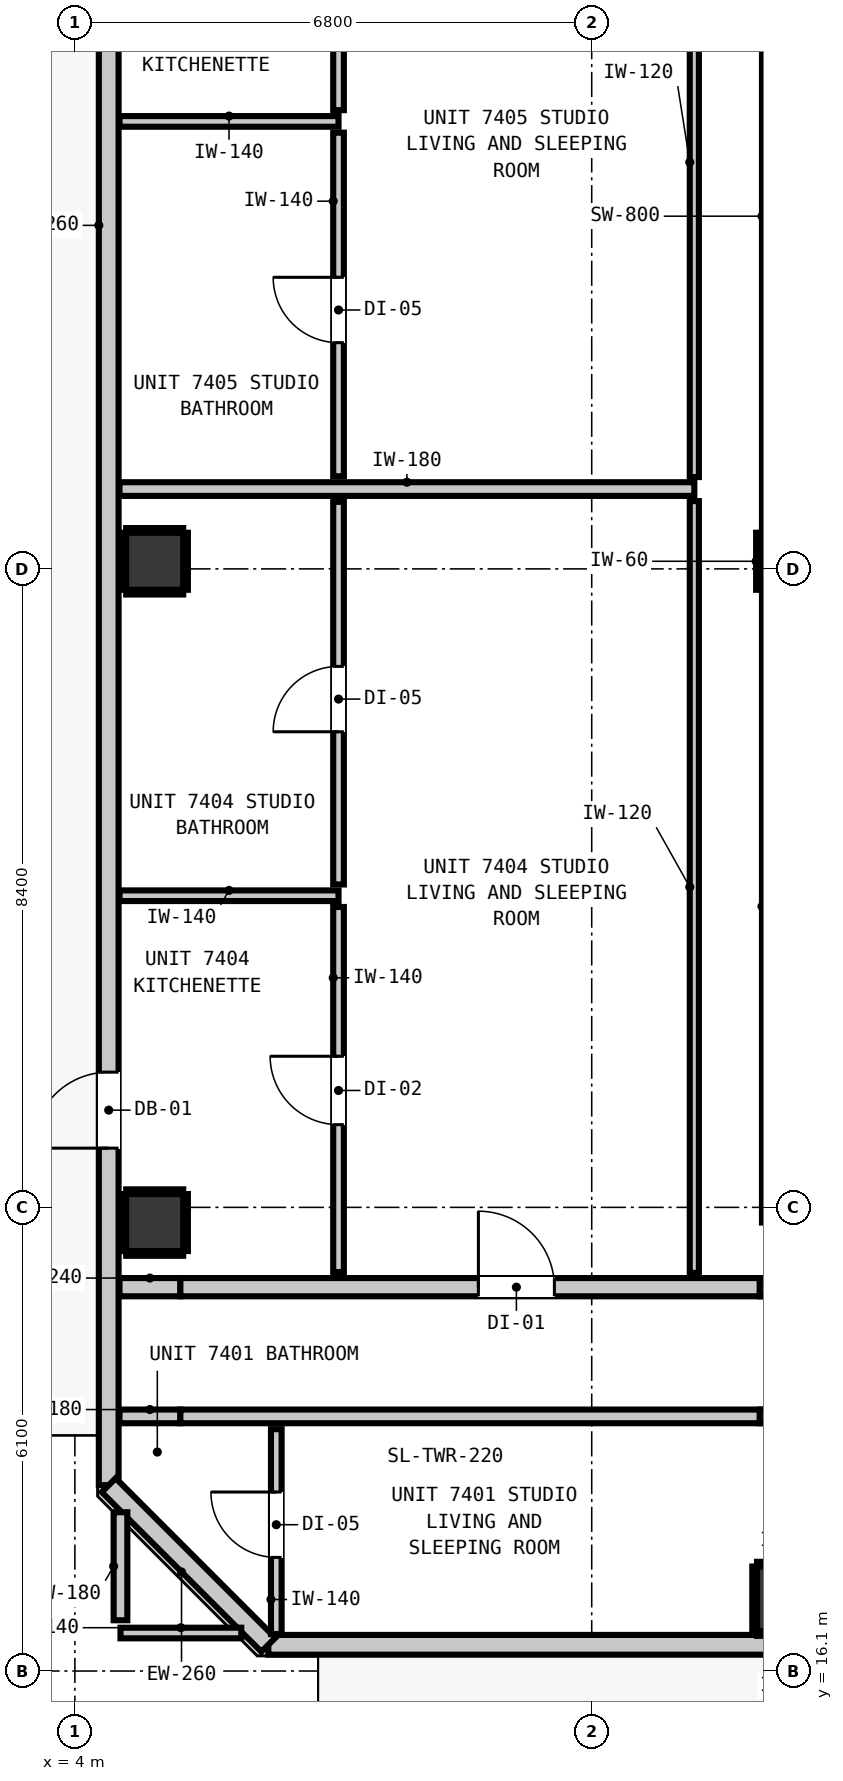
"""IFC4 building model, lengths in metres.
Left out: names, types, materials, properties, quantities, classifications, styles, units other than length and angle.
Written with IfcOpenShell. Run it as: python <this file> out.ifc"""

import sys

from ifc_helpers import new_model, si_unit, direction, frame, frame_2d, origin, origin_2d, place, context, subcontext, project, spatial, rectangle, extrude, element, fill, save


model = new_model("IFC4")
c1 = context("Model", 3, precision=1e-05, world=origin(), true_north=direction((0.0, 1.0)))
c2 = subcontext(c1, "Body", "Model", "MODEL_VIEW")
j1 = project(units=[si_unit("LENGTHUNIT", "METRE"), si_unit("PLANEANGLEUNIT", "RADIAN")], contexts=[c1])
p1 = place(None, origin())
s1 = spatial("IfcSite", under=j1, at=p1, CompositionType="ELEMENT")
p2 = place(p1, origin())
s2 = spatial("IfcBuilding", under=s1, at=p2, CompositionType="ELEMENT")
p3 = place(p2, frame((0.0, 0.0, 254.52)))
s3 = spatial("IfcBuildingStorey", under=s2, at=p3, CompositionType="ELEMENT", Elevation=254.52)
p4 = place(p3, frame((13.4, 30.7, 0.0), z_axis=(0.0, 0.0, 1.0), x_axis=(1.0, 0.0, 0.0)))
e1 = element("IfcColumn", 1, at=p4, inside=s3, PredefinedType="COLUMN", context=c2, shape_type="SweptSolid", body=[
    extrude(rectangle(XDim=0.75, YDim=0.75, at=origin_2d()), origin(), (0.0, 0.0, 1.0), 3.32),
])
p5 = place(p3, frame((13.44, 22.0, 0.0), z_axis=(0.0, 0.0, 1.0), x_axis=(0.0, 1.0, 0.0)))
e2 = element("IfcWall", 2, at=p5, inside=s3, PredefinedType="SHEAR", context=c2, shape_type="SweptSolid", body=[
    extrude(rectangle(XDim=8.32, YDim=0.8, at=frame_2d((4.16, 0.0))), origin(), (0.0, 0.0, 1.0), 3.32),
])
p6 = place(p3, frame((13.44, 31.08, 0.0), z_axis=(0.0, 0.0, 1.0), x_axis=(0.0, 1.0, 0.0)))
e3 = element("IfcWall", 3, at=p6, inside=s3, PredefinedType="SHEAR", context=c2, shape_type="SweptSolid", body=[
    extrude(rectangle(XDim=8.32, YDim=0.8, at=frame_2d((4.16, 0.0))), origin(), (0.0, 0.0, 1.0), 3.32),
])
p7 = place(p3, frame((13.4, 17.05, 0.0), z_axis=(0.0, 0.0, 1.0), x_axis=(1.0, 0.0, 0.0)))
e4 = element("IfcColumn", 4, at=p7, inside=s3, PredefinedType="COLUMN", context=c2, shape_type="SweptSolid", body=[
    extrude(rectangle(XDim=0.85, YDim=0.85, at=origin_2d()), origin(), (0.0, 0.0, 1.0), 3.32),
])
for number, where, z_axis, x_axis in (
    (5, (5.05, 22.0, 0.0), (0.0, 0.0, 1.0), (1.0, 0.0, 0.0)),
    (6, (5.05, 30.7, 0.0), (0.0, 0.0, 1.0), (1.0, 0.0, 0.0)),
):
    element("IfcColumn", number, at=place(p3, frame(where, z_axis=z_axis, x_axis=x_axis)), inside=s3, PredefinedType="COLUMN", context=c2, shape_type="SweptSolid", body=[
        extrude(rectangle(XDim=0.75, YDim=0.75, at=origin_2d()), origin(), (0.0, 0.0, 1.0), 3.32),
    ])
p8 = place(p3, frame((4.445, 18.545, 0.0), z_axis=(0.0, 0.0, 1.0), x_axis=(0.0, 1.0, 0.0)))
e7 = element("IfcWall", 7, at=p8, inside=s3, PredefinedType="STANDARD", context=c2, shape_type="SweptSolid", body=[
    extrude(rectangle(XDim=30.31, YDim=0.26, at=frame_2d((15.155, 0.0))), origin(), (0.0, 0.0, 1.0), 2.96),
])
p9 = place(p8, frame((4.434, 0.0, 0.0)))
e8 = element("IfcOpeningElement", 8, at=p9, cuts=e7, PredefinedType="OPENING", context=c2, shape_type="SweptSolid", body=[
    extrude(rectangle(XDim=1.0, YDim=2.15, at=frame_2d((0.5, 1.075))), frame((0.0, 0.14, 0.0), z_axis=(0.0, -1.0, 0.0), x_axis=(1.0, 0.0, 0.0)), (0.0, 0.0, 1.0), 0.28),
])
p10 = place(p8, frame((27.715, 0.0, 0.85)))
e9 = element("IfcOpeningElement", 9, at=p10, cuts=e7, PredefinedType="OPENING", context=c2, shape_type="SweptSolid", body=[
    extrude(rectangle(XDim=2.1, YDim=1.9, at=frame_2d((1.05, 0.95))), frame((0.0, 0.14, 0.0), z_axis=(0.0, -1.0, 0.0), x_axis=(1.0, 0.0, 0.0)), (0.0, 0.0, 1.0), 0.28),
])
p11 = place(p3, frame((39.255, 16.445, 0.0), z_axis=(0.0, 0.0, 1.0), x_axis=(-1.0, 0.0, 0.0)))
e10 = element("IfcWall", 10, at=p11, inside=s3, PredefinedType="STANDARD", context=c2, shape_type="SweptSolid", body=[
    extrude(rectangle(XDim=32.71, YDim=0.26, at=frame_2d((16.355, 0.0))), origin(), (0.0, 0.0, 1.0), 2.96),
])
p12 = place(p11, frame((0.907, 0.0, 0.0)))
e11 = element("IfcOpeningElement", 11, at=p12, cuts=e10, PredefinedType="OPENING", context=c2, shape_type="SweptSolid", body=[
    extrude(rectangle(XDim=1.0, YDim=2.15, at=frame_2d((0.5, 1.075))), frame((0.0, 0.14, 0.0), z_axis=(0.0, -1.0, 0.0), x_axis=(1.0, 0.0, 0.0)), (0.0, 0.0, 1.0), 0.28),
])
p13 = place(p11, frame((21.105, 0.0, 0.85)))
e12 = element("IfcOpeningElement", 12, at=p13, cuts=e10, PredefinedType="OPENING", context=c2, shape_type="SweptSolid", body=[
    extrude(rectangle(XDim=2.1, YDim=1.9, at=frame_2d((1.05, 0.95))), frame((0.0, 0.14, 0.0), z_axis=(0.0, -1.0, 0.0), x_axis=(1.0, 0.0, 0.0)), (0.0, 0.0, 1.0), 0.28),
])
p14 = place(p11, frame((5.355, 0.0, 0.85)))
e13 = element("IfcOpeningElement", 13, at=p14, cuts=e10, PredefinedType="OPENING", context=c2, shape_type="SweptSolid", body=[
    extrude(rectangle(XDim=2.1, YDim=1.9, at=frame_2d((1.05, 0.95))), frame((0.0, 0.14, 0.0), z_axis=(0.0, -1.0, 0.0), x_axis=(1.0, 0.0, 0.0)), (0.0, 0.0, 1.0), 0.28),
])
p15 = place(p3, frame((6.545, 16.445, 0.0), z_axis=(0.0, 0.0, 1.0), x_axis=(-0.707106781187, 0.707106781187, 0.0)))
e14 = element("IfcWall", 14, at=p15, inside=s3, PredefinedType="STANDARD", context=c2, shape_type="SweptSolid", body=[
    extrude(rectangle(XDim=2.97, YDim=0.26, at=frame_2d((1.485, 0.0))), origin(), (0.0, 0.0, 1.0), 2.96),
])
p16 = place(p3, frame((4.587, 21.15, 0.0), z_axis=(0.0, 0.0, 1.0), x_axis=(1.0, 0.0, 0.0)))
e15 = element("IfcWall", 15, at=p16, inside=s3, PredefinedType="PARTITIONING", context=c2, shape_type="SweptSolid", body=[
    extrude(rectangle(XDim=0.801, YDim=0.24, at=frame_2d((0.4, 0.0))), origin(), (0.0, 0.0, 1.0), 2.96),
])
p17 = place(p3, frame((5.388, 21.15, 0.0), z_axis=(0.0, 0.0, 1.0), x_axis=(1.0, 0.0, 0.0)))
e16 = element("IfcWall", 16, at=p17, inside=s3, PredefinedType="PARTITIONING", context=c2, shape_type="SweptSolid", body=[
    extrude(rectangle(XDim=7.624, YDim=0.24, at=frame_2d((3.812, 0.0))), origin(), (0.0, 0.0, 1.0), 2.337),
])
p18 = place(p17, frame((3.921, 0.0, 0.0)))
e17 = element("IfcOpeningElement", 17, at=p18, cuts=e16, PredefinedType="OPENING", context=c2, shape_type="SweptSolid", body=[
    extrude(rectangle(XDim=1.0, YDim=2.15, at=frame_2d((0.5, 1.075))), frame((0.0, 0.13, 0.0), z_axis=(0.0, -1.0, 0.0), x_axis=(1.0, 0.0, 0.0)), (0.0, 0.0, 1.0), 0.26),
])
p19 = place(p3, frame((13.012, 21.15, 0.0), z_axis=(0.0, 0.0, 1.0), x_axis=(1.0, 0.0, 0.0)))
e18 = element("IfcWall", 18, at=p19, inside=s3, PredefinedType="PARTITIONING", context=c2, shape_type="SweptSolid", body=[
    extrude(rectangle(XDim=28.201, YDim=0.24, at=frame_2d((14.101, 0.0))), origin(), (0.0, 0.0, 1.0), 2.96),
])
p20 = place(p19, frame((5.198, 0.0, 0.0)))
e19 = element("IfcOpeningElement", 19, at=p20, cuts=e18, PredefinedType="OPENING", context=c2, shape_type="SweptSolid", body=[
    extrude(rectangle(XDim=1.1, YDim=2.15, at=frame_2d((0.55, 1.075))), frame((0.0, 0.13, 0.0), z_axis=(0.0, -1.0, 0.0), x_axis=(1.0, 0.0, 0.0)), (0.0, 0.0, 1.0), 0.26),
])
p21 = place(p3, frame((4.587, 19.45, 0.0), z_axis=(0.0, 0.0, 1.0), x_axis=(1.0, 0.0, 0.0)))
e20 = element("IfcWall", 20, at=p21, inside=s3, PredefinedType="PARTITIONING", context=c2, shape_type="SweptSolid", body=[
    extrude(rectangle(XDim=0.801, YDim=0.18, at=frame_2d((0.4, 0.0))), origin(), (0.0, 0.0, 1.0), 2.96),
])
p22 = place(p3, frame((5.388, 19.45, 0.0), z_axis=(0.0, 0.0, 1.0), x_axis=(1.0, 0.0, 0.0)))
e21 = element("IfcWall", 21, at=p22, inside=s3, PredefinedType="PARTITIONING", context=c2, shape_type="SweptSolid", body=[
    extrude(rectangle(XDim=7.624, YDim=0.18, at=frame_2d((3.812, 0.0))), origin(), (0.0, 0.0, 1.0), 2.337),
])
p23 = place(p3, frame((13.012, 19.45, 0.0), z_axis=(0.0, 0.0, 1.0), x_axis=(1.0, 0.0, 0.0)))
e22 = element("IfcWall", 22, at=p23, inside=s3, PredefinedType="PARTITIONING", context=c2, shape_type="SweptSolid", body=[
    extrude(rectangle(XDim=28.201, YDim=0.18, at=frame_2d((14.101, 0.0))), origin(), (0.0, 0.0, 1.0), 2.96),
])
p24 = place(p23, frame((1.003, 0.0, 0.0)))
e23 = element("IfcOpeningElement", 23, at=p24, cuts=e22, PredefinedType="OPENING", context=c2, shape_type="SweptSolid", body=[
    extrude(rectangle(XDim=1.0, YDim=2.15, at=frame_2d((0.5, 1.075))), frame((0.0, 0.1, 0.0), z_axis=(0.0, -1.0, 0.0), x_axis=(1.0, 0.0, 0.0)), (0.0, 0.0, 1.0), 0.2),
])
p25 = place(p23, frame((19.16, 0.0, 0.0)))
e24 = element("IfcOpeningElement", 24, at=p25, cuts=e22, PredefinedType="OPENING", context=c2, shape_type="SweptSolid", body=[
    extrude(rectangle(XDim=1.0, YDim=2.15, at=frame_2d((0.5, 1.075))), frame((0.0, 0.1, 0.0), z_axis=(0.0, -1.0, 0.0), x_axis=(1.0, 0.0, 0.0)), (0.0, 0.0, 1.0), 0.2),
])
p26 = place(p3, frame((4.587, 31.65, 0.0), z_axis=(0.0, 0.0, 1.0), x_axis=(1.0, 0.0, 0.0)))
e25 = element("IfcWall", 25, at=p26, inside=s3, PredefinedType="PARTITIONING", context=c2, shape_type="SweptSolid", body=[
    extrude(rectangle(XDim=7.563, YDim=0.18, at=frame_2d((3.781, 0.0))), origin(), (0.0, 0.0, 1.0), 2.96),
])
p27 = place(p3, frame((4.6, 16.6, 0.0), z_axis=(0.0, 0.0, 1.0), x_axis=(1.0, 0.0, 0.0)))
e26 = element("IfcWall", 26, at=p27, inside=s3, PredefinedType="PARTITIONING", context=c2, shape_type="SweptSolid", body=[
    extrude(rectangle(XDim=1.589, YDim=0.14, at=frame_2d((0.794, 0.0))), origin(), (0.0, 0.0, 1.0), 2.96),
])
for number, where, z_axis, x_axis in (
    (27, (4.587, 26.3, 0.0), (0.0, 0.0, 1.0), (1.0, 0.0, 0.0)),
    (28, (4.587, 36.487, 0.0), (0.0, 0.0, 1.0), (1.0, 0.0, 0.0)),
):
    element("IfcWall", number, at=place(p3, frame(where, z_axis=z_axis, x_axis=x_axis)), inside=s3, PredefinedType="PARTITIONING", context=c2, shape_type="SweptSolid", body=[
        extrude(rectangle(XDim=2.882, YDim=0.14, at=frame_2d((1.441, 0.0))), origin(), (0.0, 0.0, 1.0), 2.96),
    ])
p28 = place(p3, frame((4.6, 16.768, 0.0), z_axis=(0.0, 0.0, 1.0), x_axis=(0.0, 1.0, 0.0)))
e29 = element("IfcWall", 29, at=p28, inside=s3, PredefinedType="PARTITIONING", context=c2, shape_type="SweptSolid", body=[
    extrude(rectangle(XDim=1.421, YDim=0.18, at=frame_2d((0.71, 0.0))), origin(), (0.0, 0.0, 1.0), 2.96),
])
p29 = place(p3, frame((6.65, 16.587, 0.0), z_axis=(0.0, 0.0, 1.0), x_axis=(0.0, 1.0, 0.0)))
e30 = element("IfcWall", 30, at=p29, inside=s3, PredefinedType="PARTITIONING", context=c2, shape_type="SweptSolid", body=[
    extrude(rectangle(XDim=2.695, YDim=0.14, at=frame_2d((1.348, 0.0))), origin(), (0.0, 0.0, 1.0), 2.96),
])
p30 = place(p29, frame((1.008, 0.0, 0.0)))
e31 = element("IfcOpeningElement", 31, at=p30, cuts=e30, PredefinedType="OPENING", context=c2, shape_type="SweptSolid", body=[
    extrude(rectangle(XDim=0.86, YDim=2.02, at=frame_2d((0.43, 1.01))), frame((0.0, 0.08, 0.0), z_axis=(0.0, -1.0, 0.0), x_axis=(1.0, 0.0, 0.0)), (0.0, 0.0, 1.0), 0.16),
])
p31 = place(p3, frame((7.469, 21.348, 0.0), z_axis=(0.0, 0.0, 1.0), x_axis=(0.0, 1.0, 0.0)))
e32 = element("IfcWall", 32, at=p31, inside=s3, PredefinedType="PARTITIONING", context=c2, shape_type="SweptSolid", body=[
    extrude(rectangle(XDim=4.804, YDim=0.14, at=frame_2d((2.402, 0.0))), origin(), (0.0, 0.0, 1.0), 2.96),
])
p32 = place(p31, frame((1.94, 0.0, 0.0)))
e33 = element("IfcOpeningElement", 33, at=p32, cuts=e32, PredefinedType="OPENING", context=c2, shape_type="SweptSolid", body=[
    extrude(rectangle(XDim=0.9, YDim=2.1, at=frame_2d((0.45, 1.05))), frame((0.0, 0.08, 0.0), z_axis=(0.0, -1.0, 0.0), x_axis=(1.0, 0.0, 0.0)), (0.0, 0.0, 1.0), 0.16),
])
p33 = place(p3, frame((7.469, 26.448, 0.0), z_axis=(0.0, 0.0, 1.0), x_axis=(0.0, 1.0, 0.0)))
e34 = element("IfcWall", 34, at=p33, inside=s3, PredefinedType="PARTITIONING", context=c2, shape_type="SweptSolid", body=[
    extrude(rectangle(XDim=5.034, YDim=0.14, at=frame_2d((2.517, 0.0))), origin(), (0.0, 0.0, 1.0), 2.96),
])
p34 = place(p33, frame((2.009, 0.0, 0.0)))
e35 = element("IfcOpeningElement", 35, at=p34, cuts=e34, PredefinedType="OPENING", context=c2, shape_type="SweptSolid", body=[
    extrude(rectangle(XDim=0.86, YDim=2.02, at=frame_2d((0.43, 1.01))), frame((0.0, 0.08, 0.0), z_axis=(0.0, -1.0, 0.0), x_axis=(1.0, 0.0, 0.0)), (0.0, 0.0, 1.0), 0.16),
])
p35 = place(p3, frame((7.469, 31.818, 0.0), z_axis=(0.0, 0.0, 1.0), x_axis=(0.0, 1.0, 0.0)))
e36 = element("IfcWall", 36, at=p35, inside=s3, PredefinedType="PARTITIONING", context=c2, shape_type="SweptSolid", body=[
    extrude(rectangle(XDim=4.521, YDim=0.14, at=frame_2d((2.26, 0.0))), origin(), (0.0, 0.0, 1.0), 2.96),
])
p36 = place(p35, frame((1.758, 0.0, 0.0)))
e37 = element("IfcOpeningElement", 37, at=p36, cuts=e36, PredefinedType="OPENING", context=c2, shape_type="SweptSolid", body=[
    extrude(rectangle(XDim=0.86, YDim=2.02, at=frame_2d((0.43, 1.01))), frame((0.0, 0.08, 0.0), z_axis=(0.0, -1.0, 0.0), x_axis=(1.0, 0.0, 0.0)), (0.0, 0.0, 1.0), 0.16),
])
p37 = place(p3, frame((7.469, 36.635, 0.0), z_axis=(0.0, 0.0, 1.0), x_axis=(0.0, 1.0, 0.0)))
e38 = element("IfcWall", 38, at=p37, inside=s3, PredefinedType="PARTITIONING", context=c2, shape_type="SweptSolid", body=[
    extrude(rectangle(XDim=3.447, YDim=0.14, at=frame_2d((1.724, 0.0))), origin(), (0.0, 0.0, 1.0), 2.96),
])
p38 = place(p37, frame((1.271, 0.0, 0.0)))
e39 = element("IfcOpeningElement", 39, at=p38, cuts=e38, PredefinedType="OPENING", context=c2, shape_type="SweptSolid", body=[
    extrude(rectangle(XDim=0.9, YDim=2.1, at=frame_2d((0.45, 1.05))), frame((0.0, 0.08, 0.0), z_axis=(0.0, -1.0, 0.0), x_axis=(1.0, 0.0, 0.0)), (0.0, 0.0, 1.0), 0.16),
])
p39 = place(p3, frame((12.15, 21.338, 0.0), z_axis=(0.0, 0.0, 1.0), x_axis=(0.0, 1.0, 0.0)))
e40 = element("IfcWall", 40, at=p39, inside=s3, PredefinedType="PARTITIONING", context=c2, shape_type="SweptSolid", body=[
    extrude(rectangle(XDim=10.154, YDim=0.12, at=frame_2d((5.077, 0.0))), origin(), (0.0, 0.0, 1.0), 2.96),
])
p40 = place(p3, frame((12.15, 31.808, 0.0), z_axis=(0.0, 0.0, 1.0), x_axis=(0.0, 1.0, 0.0)))
e41 = element("IfcWall", 41, at=p40, inside=s3, PredefinedType="PARTITIONING", context=c2, shape_type="SweptSolid", body=[
    extrude(rectangle(XDim=8.284, YDim=0.12, at=frame_2d((4.142, 0.0))), origin(), (0.0, 0.0, 1.0), 2.96),
])
p41 = place(p3, frame((12.993, 30.325, 0.0), z_axis=(0.0, 0.0, 1.0), x_axis=(0.0, 1.0, 0.0)))
e42 = element("IfcWall", 42, at=p41, inside=s3, PredefinedType="PARTITIONING", context=c2, shape_type="SweptSolid", body=[
    extrude(rectangle(XDim=0.75, YDim=0.06, at=frame_2d((0.375, 0.0))), origin(), (0.0, 0.0, 1.0), 1.45),
])
for number, where, z_axis, x_axis in (
    (43, (12.975, 16.593, 0.0), (0.0, 0.0, 1.0), (1.0, 0.0, 0.0)),
    (44, (12.975, 17.507, 0.0), (0.0, 0.0, 1.0), (1.0, 0.0, 0.0)),
):
    element("IfcWall", number, at=place(p3, frame(where, z_axis=z_axis, x_axis=x_axis)), inside=s3, PredefinedType="PARTITIONING", context=c2, shape_type="SweptSolid", body=[
        extrude(rectangle(XDim=0.85, YDim=0.06, at=frame_2d((0.425, 0.0))), origin(), (0.0, 0.0, 1.0), 1.45),
    ])
p42 = place(p3, frame((12.943, 16.625, 0.0), z_axis=(0.0, 0.0, 1.0), x_axis=(0.0, 1.0, 0.0)))
e45 = element("IfcWall", 45, at=p42, inside=s3, PredefinedType="PARTITIONING", context=c2, shape_type="SweptSolid", body=[
    extrude(rectangle(XDim=0.85, YDim=0.06, at=frame_2d((0.425, 0.0))), origin(), (0.0, 0.0, 1.0), 1.45),
])
for number, where, z_axis, x_axis in (
    (46, (4.675, 21.593, 0.0), (0.0, 0.0, 1.0), (1.0, 0.0, 0.0)),
    (47, (4.675, 22.407, 0.0), (0.0, 0.0, 1.0), (1.0, 0.0, 0.0)),
    (48, (4.643, 21.625, 0.0), (0.0, 0.0, 1.0), (0.0, 1.0, 0.0)),
    (49, (5.457, 21.625, 0.0), (0.0, 0.0, 1.0), (0.0, 1.0, 0.0)),
    (50, (4.675, 30.293, 0.0), (0.0, 0.0, 1.0), (1.0, 0.0, 0.0)),
    (51, (4.675, 31.107, 0.0), (0.0, 0.0, 1.0), (1.0, 0.0, 0.0)),
    (52, (4.643, 30.325, 0.0), (0.0, 0.0, 1.0), (0.0, 1.0, 0.0)),
    (53, (5.457, 30.325, 0.0), (0.0, 0.0, 1.0), (0.0, 1.0, 0.0)),
):
    element("IfcWall", number, at=place(p3, frame(where, z_axis=z_axis, x_axis=x_axis)), inside=s3, PredefinedType="PARTITIONING", context=c2, shape_type="SweptSolid", body=[
        extrude(rectangle(XDim=0.75, YDim=0.06, at=frame_2d((0.375, 0.0))), origin(), (0.0, 0.0, 1.0), 1.45),
    ])
p43 = place(p9, origin())
e54 = element("IfcDoor", 54, at=p43, inside=s3, OperationType="SINGLE_SWING_LEFT", PredefinedType="DOOR", context=c2, shape_type="SweptSolid", body=[
    extrude(rectangle(XDim=1.0, YDim=2.15, at=frame_2d((0.5, 1.075))), frame((0.0, 0.025, 0.0), z_axis=(0.0, -1.0, 0.0), x_axis=(1.0, 0.0, 0.0)), (0.0, 0.0, 1.0), 0.05),
])
fill(e8, e54)
p44 = place(p30, origin())
e55 = element("IfcDoor", 55, at=p44, inside=s3, OperationType="SINGLE_SWING_RIGHT", PredefinedType="DOOR", context=c2, shape_type="SweptSolid", body=[
    extrude(rectangle(XDim=0.86, YDim=2.02, at=frame_2d((0.43, 1.01))), frame((0.0, 0.025, 0.0), z_axis=(0.0, -1.0, 0.0), x_axis=(1.0, 0.0, 0.0)), (0.0, 0.0, 1.0), 0.05),
])
fill(e31, e55)
p45 = place(p18, origin())
e56 = element("IfcDoor", 56, at=p45, inside=s3, OperationType="SINGLE_SWING_LEFT", PredefinedType="DOOR", context=c2, shape_type="SweptSolid", body=[
    extrude(rectangle(XDim=1.0, YDim=2.15, at=frame_2d((0.5, 1.075))), frame((0.0, 0.025, 0.0), z_axis=(0.0, -1.0, 0.0), x_axis=(1.0, 0.0, 0.0)), (0.0, 0.0, 1.0), 0.05),
])
fill(e17, e56)
p46 = place(p32, origin())
e57 = element("IfcDoor", 57, at=p46, inside=s3, OperationType="SINGLE_SWING_RIGHT", PredefinedType="DOOR", context=c2, shape_type="SweptSolid", body=[
    extrude(rectangle(XDim=0.9, YDim=2.1, at=frame_2d((0.45, 1.05))), frame((0.0, 0.025, 0.0), z_axis=(0.0, -1.0, 0.0), x_axis=(1.0, 0.0, 0.0)), (0.0, 0.0, 1.0), 0.05),
])
fill(e33, e57)
p47 = place(p34, origin())
e58 = element("IfcDoor", 58, at=p47, inside=s3, OperationType="SINGLE_SWING_LEFT", PredefinedType="DOOR", context=c2, shape_type="SweptSolid", body=[
    extrude(rectangle(XDim=0.86, YDim=2.02, at=frame_2d((0.43, 1.01))), frame((0.0, 0.025, 0.0), z_axis=(0.0, -1.0, 0.0), x_axis=(1.0, 0.0, 0.0)), (0.0, 0.0, 1.0), 0.05),
])
fill(e35, e58)
p48 = place(p36, origin())
e59 = element("IfcDoor", 59, at=p48, inside=s3, OperationType="SINGLE_SWING_RIGHT", PredefinedType="DOOR", context=c2, shape_type="SweptSolid", body=[
    extrude(rectangle(XDim=0.86, YDim=2.02, at=frame_2d((0.43, 1.01))), frame((0.0, 0.025, 0.0), z_axis=(0.0, -1.0, 0.0), x_axis=(1.0, 0.0, 0.0)), (0.0, 0.0, 1.0), 0.05),
])
fill(e37, e59)
save(model, sys.argv[1])
